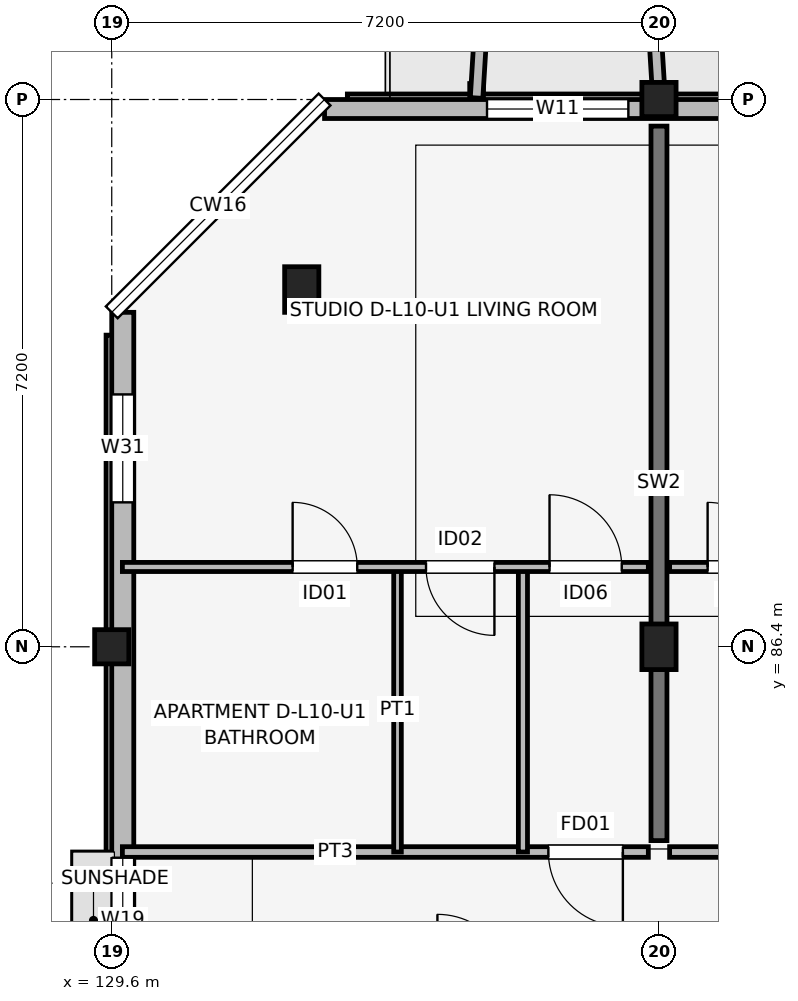
"""IFC4 building model, lengths in metres.
Left out: names, types, materials, properties, quantities, classifications, styles, units other than length and angle.
Written with IfcOpenShell. Run it as: python <this file> out.ifc"""

import sys

from ifc_helpers import new_model, si_unit, direction, frame, frame_2d, origin, origin_2d, place, context, subcontext, project, spatial, rectangle, extrude, element, fill, save


model = new_model("IFC4")
c1 = context("Model", 3, precision=1e-05, world=origin(), true_north=direction((0.0, 1.0)))
c2 = subcontext(c1, "Body", "Model", "MODEL_VIEW")
j1 = project(units=[si_unit("LENGTHUNIT", "METRE"), si_unit("PLANEANGLEUNIT", "RADIAN")], contexts=[c1])
p1 = place(None, origin())
s1 = spatial("IfcSite", under=j1, at=p1, CompositionType="ELEMENT")
p2 = place(p1, origin())
s2 = spatial("IfcBuilding", under=s1, at=p2, CompositionType="ELEMENT")
p3 = place(p2, frame((0.0, 0.0, 33.9)))
s3 = spatial("IfcBuildingStorey", under=s2, at=p3, CompositionType="ELEMENT", Elevation=33.9)
p4 = place(p3, frame((129.6, 86.4, 0.0), z_axis=(0.0, 0.0, 1.0), x_axis=(1.0, 0.0, 0.0)))
e1 = element("IfcColumn", 1, at=p4, inside=s3, PredefinedType="COLUMN", context=c2, shape_type="SweptSolid", body=[
    extrude(rectangle(XDim=0.45, YDim=0.45, at=origin_2d()), origin(), (0.0, 0.0, 1.0), 3.15),
])
for number, where, z_axis, x_axis in (
    (2, (132.1, 91.1, 0.0), (0.0, 0.0, 1.0), (1.0, 0.0, 0.0)),
    (3, (136.8, 86.4, 0.0), (0.0, 0.0, 1.0), (1.0, 0.0, 0.0)),
):
    element("IfcColumn", number, at=place(p3, frame(where, z_axis=z_axis, x_axis=x_axis)), inside=s3, PredefinedType="COLUMN", context=c2, shape_type="SweptSolid", body=[
        extrude(rectangle(XDim=0.45, YDim=0.6, at=origin_2d()), origin(), (0.0, 0.0, 1.0), 3.15),
    ])
p5 = place(p3, frame((136.8, 93.6, 0.0), z_axis=(0.0, 0.0, 1.0), x_axis=(1.0, 0.0, 0.0)))
e4 = element("IfcColumn", 4, at=p5, inside=s3, PredefinedType="COLUMN", context=c2, shape_type="SweptSolid", body=[
    extrude(rectangle(XDim=0.45, YDim=0.45, at=origin_2d()), origin(), (0.0, 0.0, 1.0), 3.15),
])
p6 = place(p3, frame((136.8, 83.85, 0.0), z_axis=(0.0, 0.0, 1.0), x_axis=(0.0, 1.0, 0.0)))
e5 = element("IfcWall", 5, at=p6, inside=s3, PredefinedType="SHEAR", context=c2, shape_type="SweptSolid", body=[
    extrude(rectangle(XDim=9.4, YDim=0.21, at=frame_2d((4.7, 0.0))), origin(), (0.0, 0.0, 1.0), 3.15),
])
p7 = place(p3, frame((162.8, 93.475, 0.0), z_axis=(0.0, 0.0, 1.0), x_axis=(-1.0, 0.0, 0.0)))
e6 = element("IfcWall", 6, at=p7, inside=s3, PredefinedType="SOLIDWALL", context=c2, shape_type="SweptSolid", body=[
    extrude(rectangle(XDim=30.4, YDim=0.25, at=frame_2d((15.2, 0.0))), origin(), (0.0, 0.0, 1.0), 2.45),
])
p8 = place(p7, frame((23.15, 0.0, 0.0), z_axis=(0.0, 0.0, 1.0), x_axis=(-1.0, 0.0, 0.0)))
e7 = element("IfcOpeningElement", 7, at=p8, cuts=e6, PredefinedType="OPENING", context=c2, shape_type="SweptSolid", body=[
    extrude(rectangle(XDim=1.5, YDim=2.15, at=frame_2d((0.75, 1.075))), frame((0.0, 0.135, 0.0), z_axis=(0.0, -1.0, 0.0), x_axis=(1.0, 0.0, 0.0)), (0.0, 0.0, 1.0), 0.27),
])
p9 = place(p7, frame((8.9, 0.0, 0.0), z_axis=(0.0, 0.0, 1.0), x_axis=(-1.0, 0.0, 0.0)))
e8 = element("IfcOpeningElement", 8, at=p9, cuts=e6, PredefinedType="OPENING", context=c2, shape_type="SweptSolid", body=[
    extrude(rectangle(XDim=1.8, YDim=2.15, at=frame_2d((0.9, 1.075))), frame((0.0, 0.135, 0.0), z_axis=(0.0, -1.0, 0.0), x_axis=(1.0, 0.0, 0.0)), (0.0, 0.0, 1.0), 0.27),
])
p10 = place(p7, frame((26.403, 0.0, 0.7)))
e9 = element("IfcOpeningElement", 9, at=p10, cuts=e6, PredefinedType="OPENING", context=c2, shape_type="SweptSolid", body=[
    extrude(rectangle(XDim=1.86, YDim=1.6, at=frame_2d((0.93, 0.8))), frame((0.0, 0.135, 0.0), z_axis=(0.0, -1.0, 0.0), x_axis=(1.0, 0.0, 0.0)), (0.0, 0.0, 1.0), 0.27),
])
p11 = place(p7, frame((16.538, 0.0, 0.7)))
e10 = element("IfcOpeningElement", 10, at=p11, cuts=e6, PredefinedType="OPENING", context=c2, shape_type="SweptSolid", body=[
    extrude(rectangle(XDim=1.86, YDim=1.6, at=frame_2d((0.93, 0.8))), frame((0.0, 0.135, 0.0), z_axis=(0.0, -1.0, 0.0), x_axis=(1.0, 0.0, 0.0)), (0.0, 0.0, 1.0), 0.27),
])
p12 = place(p7, frame((12.262, 0.0, 0.75)))
e11 = element("IfcOpeningElement", 11, at=p12, cuts=e6, PredefinedType="OPENING", context=c2, shape_type="SweptSolid", body=[
    extrude(rectangle(XDim=1.34, YDim=1.55, at=frame_2d((0.67, 0.775))), frame((0.0, 0.135, 0.0), z_axis=(0.0, -1.0, 0.0), x_axis=(1.0, 0.0, 0.0)), (0.0, 0.0, 1.0), 0.27),
])
p13 = place(p7, frame((9.748, 0.0, 0.75)))
e12 = element("IfcOpeningElement", 12, at=p13, cuts=e6, PredefinedType="OPENING", context=c2, shape_type="SweptSolid", body=[
    extrude(rectangle(XDim=1.46, YDim=1.55, at=frame_2d((0.73, 0.775))), frame((0.0, 0.135, 0.0), z_axis=(0.0, -1.0, 0.0), x_axis=(1.0, 0.0, 0.0)), (0.0, 0.0, 1.0), 0.27),
])
p14 = place(p7, frame((2.978, 0.0, 0.75)))
e13 = element("IfcOpeningElement", 13, at=p14, cuts=e6, PredefinedType="OPENING", context=c2, shape_type="SweptSolid", body=[
    extrude(rectangle(XDim=0.6, YDim=1.25, at=frame_2d((0.3, 0.625))), frame((0.0, 0.135, 0.0), z_axis=(0.0, -1.0, 0.0), x_axis=(1.0, 0.0, 0.0)), (0.0, 0.0, 1.0), 0.27),
])
p15 = place(p7, frame((0.725, 0.0, 0.75)))
e14 = element("IfcOpeningElement", 14, at=p15, cuts=e6, PredefinedType="OPENING", context=c2, shape_type="SweptSolid", body=[
    extrude(rectangle(XDim=0.72, YDim=1.35, at=frame_2d((0.36, 0.675))), frame((0.0, 0.135, 0.0), z_axis=(0.0, -1.0, 0.0), x_axis=(1.0, 0.0, 0.0)), (0.0, 0.0, 1.0), 0.27),
])
p16 = place(p3, frame((129.745, 90.8, 0.0), z_axis=(0.0, 0.0, 1.0), x_axis=(0.0, -1.0, 0.0)))
e15 = element("IfcWall", 15, at=p16, inside=s3, PredefinedType="SOLIDWALL", context=c2, shape_type="SweptSolid", body=[
    extrude(rectangle(XDim=16.0, YDim=0.29, at=frame_2d((8.0, 0.0))), origin(), (0.0, 0.0, 1.0), 2.48),
])
p17 = place(p16, frame((7.175, 0.0, 1.05)))
e16 = element("IfcOpeningElement", 16, at=p17, cuts=e15, PredefinedType="OPENING", context=c2, shape_type="SweptSolid", body=[
    extrude(rectangle(XDim=1.65, YDim=1.15, at=frame_2d((0.825, 0.575))), frame((0.0, 0.155, 0.0), z_axis=(0.0, -1.0, 0.0), x_axis=(1.0, 0.0, 0.0)), (0.0, 0.0, 1.0), 0.31),
])
p18 = place(p16, frame((1.08, 0.0, 0.75)))
e17 = element("IfcOpeningElement", 17, at=p18, cuts=e15, PredefinedType="OPENING", context=c2, shape_type="SweptSolid", body=[
    extrude(rectangle(XDim=1.42, YDim=1.6, at=frame_2d((0.71, 0.8))), frame((0.0, 0.155, 0.0), z_axis=(0.0, -1.0, 0.0), x_axis=(1.0, 0.0, 0.0)), (0.0, 0.0, 1.0), 0.31),
])
for number, where, z_axis, x_axis in (
    (18, (134.4, 93.62, 0.0), (0.0, 0.0, 1.0), (0.061, 0.998, 0.0)),
    (19, (136.8, 93.62, 0.0), (0.0, 0.0, 1.0), (-0.061, 0.998, 0.0)),
):
    element("IfcWall", number, at=place(p3, frame(where, z_axis=z_axis, x_axis=x_axis)), inside=s3, PredefinedType="ELEMENTEDWALL", context=c2, shape_type="SweptSolid", body=[
        extrude(rectangle(XDim=1.964, YDim=0.165, at=frame_2d((0.982, 0.0))), origin(), (0.0, 0.0, 1.0), 2.95),
    ])
p19 = place(p3, frame((129.74, 83.7, 0.0), z_axis=(0.0, 0.0, 1.0), x_axis=(1.0, 0.0, 0.0)))
e20 = element("IfcWall", 20, at=p19, inside=s3, PredefinedType="PARTITIONING", context=c2, shape_type="SweptSolid", body=[
    extrude(rectangle(XDim=6.92, YDim=0.14, at=frame_2d((3.46, 0.0))), origin(), (0.0, 0.0, 1.0), 2.38),
])
p20 = place(p19, frame((6.585, 0.0, 0.0), z_axis=(0.0, 0.0, 1.0), x_axis=(-1.0, 0.0, 0.0)))
e21 = element("IfcOpeningElement", 21, at=p20, cuts=e20, PredefinedType="OPENING", context=c2, shape_type="SweptSolid", body=[
    extrude(rectangle(XDim=0.98, YDim=2.1, at=frame_2d((0.49, 1.05))), frame((0.0, 0.08, 0.0), z_axis=(0.0, -1.0, 0.0), x_axis=(1.0, 0.0, 0.0)), (0.0, 0.0, 1.0), 0.16),
])
p21 = place(p3, frame((133.36, 83.7, 0.0), z_axis=(0.0, 0.0, 1.0), x_axis=(0.0, 1.0, 0.0)))
e22 = element("IfcWall", 22, at=p21, inside=s3, PredefinedType="PARTITIONING", context=c2, shape_type="SweptSolid", body=[
    extrude(rectangle(XDim=3.75, YDim=0.1, at=frame_2d((1.875, 0.0))), origin(), (0.0, 0.0, 1.0), 2.38),
])
p22 = place(p3, frame((135.01, 83.7, 0.0), z_axis=(0.0, 0.0, 1.0), x_axis=(0.0, 1.0, 0.0)))
e23 = element("IfcWall", 23, at=p22, inside=s3, PredefinedType="PARTITIONING", context=c2, shape_type="SweptSolid", body=[
    extrude(rectangle(XDim=3.75, YDim=0.12, at=frame_2d((1.875, 0.0))), origin(), (0.0, 0.0, 1.0), 2.38),
])
p23 = place(p3, frame((129.74, 87.45, 0.0), z_axis=(0.0, 0.0, 1.0), x_axis=(1.0, 0.0, 0.0)))
e24 = element("IfcWall", 24, at=p23, inside=s3, PredefinedType="PARTITIONING", context=c2, shape_type="SweptSolid", body=[
    extrude(rectangle(XDim=6.92, YDim=0.12, at=frame_2d((3.46, 0.0))), origin(), (0.0, 0.0, 1.0), 2.38),
])
p24 = place(p23, frame((2.24, 0.0, 0.0)))
e25 = element("IfcOpeningElement", 25, at=p24, cuts=e24, PredefinedType="OPENING", context=c2, shape_type="SweptSolid", body=[
    extrude(rectangle(XDim=0.85, YDim=2.08, at=frame_2d((0.425, 1.04))), frame((0.0, 0.07, 0.0), z_axis=(0.0, -1.0, 0.0), x_axis=(1.0, 0.0, 0.0)), (0.0, 0.0, 1.0), 0.14),
])
p25 = place(p23, frame((4.895, 0.0, 0.0), z_axis=(0.0, 0.0, 1.0), x_axis=(-1.0, 0.0, 0.0)))
e26 = element("IfcOpeningElement", 26, at=p25, cuts=e24, PredefinedType="OPENING", context=c2, shape_type="SweptSolid", body=[
    extrude(rectangle(XDim=0.9, YDim=2.08, at=frame_2d((0.45, 1.04))), frame((0.0, 0.07, 0.0), z_axis=(0.0, -1.0, 0.0), x_axis=(1.0, 0.0, 0.0)), (0.0, 0.0, 1.0), 0.14),
])
p26 = place(p23, frame((5.62, 0.0, 0.0)))
e27 = element("IfcOpeningElement", 27, at=p26, cuts=e24, PredefinedType="OPENING", context=c2, shape_type="SweptSolid", body=[
    extrude(rectangle(XDim=0.95, YDim=2.08, at=frame_2d((0.475, 1.04))), frame((0.0, 0.07, 0.0), z_axis=(0.0, -1.0, 0.0), x_axis=(1.0, 0.0, 0.0)), (0.0, 0.0, 1.0), 0.14),
])
p27 = place(p3, frame((136.94, 83.7, 0.0), z_axis=(0.0, 0.0, 1.0), x_axis=(1.0, 0.0, 0.0)))
e28 = element("IfcWall", 28, at=p27, inside=s3, PredefinedType="PARTITIONING", context=c2, shape_type="SweptSolid", body=[
    extrude(rectangle(XDim=6.92, YDim=0.14, at=frame_2d((3.46, 0.0))), origin(), (0.0, 0.0, 1.0), 2.38),
])
p28 = place(p27, frame((5.85, 0.0, 0.0), z_axis=(0.0, 0.0, 1.0), x_axis=(-1.0, 0.0, 0.0)))
e29 = element("IfcOpeningElement", 29, at=p28, cuts=e28, PredefinedType="OPENING", context=c2, shape_type="SweptSolid", body=[
    extrude(rectangle(XDim=0.98, YDim=2.1, at=frame_2d((0.49, 1.05))), frame((0.0, 0.08, 0.0), z_axis=(0.0, -1.0, 0.0), x_axis=(1.0, 0.0, 0.0)), (0.0, 0.0, 1.0), 0.16),
])
p29 = place(p3, frame((136.94, 87.45, 0.0), z_axis=(0.0, 0.0, 1.0), x_axis=(1.0, 0.0, 0.0)))
e30 = element("IfcWall", 30, at=p29, inside=s3, PredefinedType="PARTITIONING", context=c2, shape_type="SweptSolid", body=[
    extrude(rectangle(XDim=6.92, YDim=0.12, at=frame_2d((3.46, 0.0))), origin(), (0.0, 0.0, 1.0), 2.38),
])
p30 = place(p29, frame((0.5, 0.0, 0.0)))
e31 = element("IfcOpeningElement", 31, at=p30, cuts=e30, PredefinedType="OPENING", context=c2, shape_type="SweptSolid", body=[
    extrude(rectangle(XDim=0.85, YDim=2.08, at=frame_2d((0.425, 1.04))), frame((0.0, 0.07, 0.0), z_axis=(0.0, -1.0, 0.0), x_axis=(1.0, 0.0, 0.0)), (0.0, 0.0, 1.0), 0.14),
])
p31 = place(p29, frame((3.275, 0.0, 0.0), z_axis=(0.0, 0.0, 1.0), x_axis=(-1.0, 0.0, 0.0)))
e32 = element("IfcOpeningElement", 32, at=p31, cuts=e30, PredefinedType="OPENING", context=c2, shape_type="SweptSolid", body=[
    extrude(rectangle(XDim=0.9, YDim=2.08, at=frame_2d((0.45, 1.04))), frame((0.0, 0.07, 0.0), z_axis=(0.0, -1.0, 0.0), x_axis=(1.0, 0.0, 0.0)), (0.0, 0.0, 1.0), 0.14),
])
p32 = place(p29, frame((4.885, 0.0, 0.0)))
e33 = element("IfcOpeningElement", 33, at=p32, cuts=e30, PredefinedType="OPENING", context=c2, shape_type="SweptSolid", body=[
    extrude(rectangle(XDim=0.95, YDim=2.08, at=frame_2d((0.475, 1.04))), frame((0.0, 0.07, 0.0), z_axis=(0.0, -1.0, 0.0), x_axis=(1.0, 0.0, 0.0)), (0.0, 0.0, 1.0), 0.14),
])
p33 = place(p10, origin())
e34 = element("IfcWindow", 34, at=p33, inside=s3, PartitioningType="SINGLE_PANEL", PredefinedType="WINDOW", context=c2, shape_type="SweptSolid", body=[
    extrude(rectangle(XDim=1.86, YDim=1.6, at=frame_2d((0.93, 0.8))), frame((0.0, 0.03, 0.0), z_axis=(0.0, -1.0, 0.0), x_axis=(1.0, 0.0, 0.0)), (0.0, 0.0, 1.0), 0.06),
])
fill(e9, e34)
p34 = place(p17, origin())
e35 = element("IfcWindow", 35, at=p34, inside=s3, PartitioningType="SINGLE_PANEL", PredefinedType="WINDOW", context=c2, shape_type="SweptSolid", body=[
    extrude(rectangle(XDim=1.65, YDim=1.15, at=frame_2d((0.825, 0.575))), frame((0.0, 0.03, 0.0), z_axis=(0.0, -1.0, 0.0), x_axis=(1.0, 0.0, 0.0)), (0.0, 0.0, 1.0), 0.06),
])
fill(e16, e35)
p35 = place(p18, origin())
e36 = element("IfcWindow", 36, at=p35, inside=s3, PartitioningType="SINGLE_PANEL", PredefinedType="WINDOW", context=c2, shape_type="SweptSolid", body=[
    extrude(rectangle(XDim=1.42, YDim=1.6, at=frame_2d((0.71, 0.8))), frame((0.0, 0.03, 0.0), z_axis=(0.0, -1.0, 0.0), x_axis=(1.0, 0.0, 0.0)), (0.0, 0.0, 1.0), 0.06),
])
fill(e17, e36)
p36 = place(p20, origin())
e37 = element("IfcDoor", 37, at=p36, inside=s3, OperationType="SINGLE_SWING_RIGHT", PredefinedType="DOOR", context=c2, shape_type="SweptSolid", body=[
    extrude(rectangle(XDim=0.98, YDim=2.1, at=frame_2d((0.49, 1.05))), frame((0.0, 0.025, 0.0), z_axis=(0.0, -1.0, 0.0), x_axis=(1.0, 0.0, 0.0)), (0.0, 0.0, 1.0), 0.05),
])
fill(e21, e37)
p37 = place(p24, origin())
e38 = element("IfcDoor", 38, at=p37, inside=s3, OperationType="SINGLE_SWING_LEFT", PredefinedType="DOOR", context=c2, shape_type="SweptSolid", body=[
    extrude(rectangle(XDim=0.85, YDim=2.08, at=frame_2d((0.425, 1.04))), frame((0.0, 0.025, 0.0), z_axis=(0.0, -1.0, 0.0), x_axis=(1.0, 0.0, 0.0)), (0.0, 0.0, 1.0), 0.05),
])
fill(e25, e38)
p38 = place(p25, origin())
e39 = element("IfcDoor", 39, at=p38, inside=s3, OperationType="SINGLE_SWING_RIGHT", PredefinedType="DOOR", context=c2, shape_type="SweptSolid", body=[
    extrude(rectangle(XDim=0.9, YDim=2.08, at=frame_2d((0.45, 1.04))), frame((0.0, 0.025, 0.0), z_axis=(0.0, -1.0, 0.0), x_axis=(1.0, 0.0, 0.0)), (0.0, 0.0, 1.0), 0.05),
])
fill(e26, e39)
p39 = place(p26, origin())
e40 = element("IfcDoor", 40, at=p39, inside=s3, OperationType="SINGLE_SWING_LEFT", PredefinedType="DOOR", context=c2, shape_type="SweptSolid", body=[
    extrude(rectangle(XDim=0.95, YDim=2.08, at=frame_2d((0.475, 1.04))), frame((0.0, 0.025, 0.0), z_axis=(0.0, -1.0, 0.0), x_axis=(1.0, 0.0, 0.0)), (0.0, 0.0, 1.0), 0.05),
])
fill(e27, e40)
p40 = place(p30, origin())
e41 = element("IfcDoor", 41, at=p40, inside=s3, OperationType="SINGLE_SWING_LEFT", PredefinedType="DOOR", context=c2, shape_type="SweptSolid", body=[
    extrude(rectangle(XDim=0.85, YDim=2.08, at=frame_2d((0.425, 1.04))), frame((0.0, 0.025, 0.0), z_axis=(0.0, -1.0, 0.0), x_axis=(1.0, 0.0, 0.0)), (0.0, 0.0, 1.0), 0.05),
])
fill(e31, e41)
save(model, sys.argv[1])
